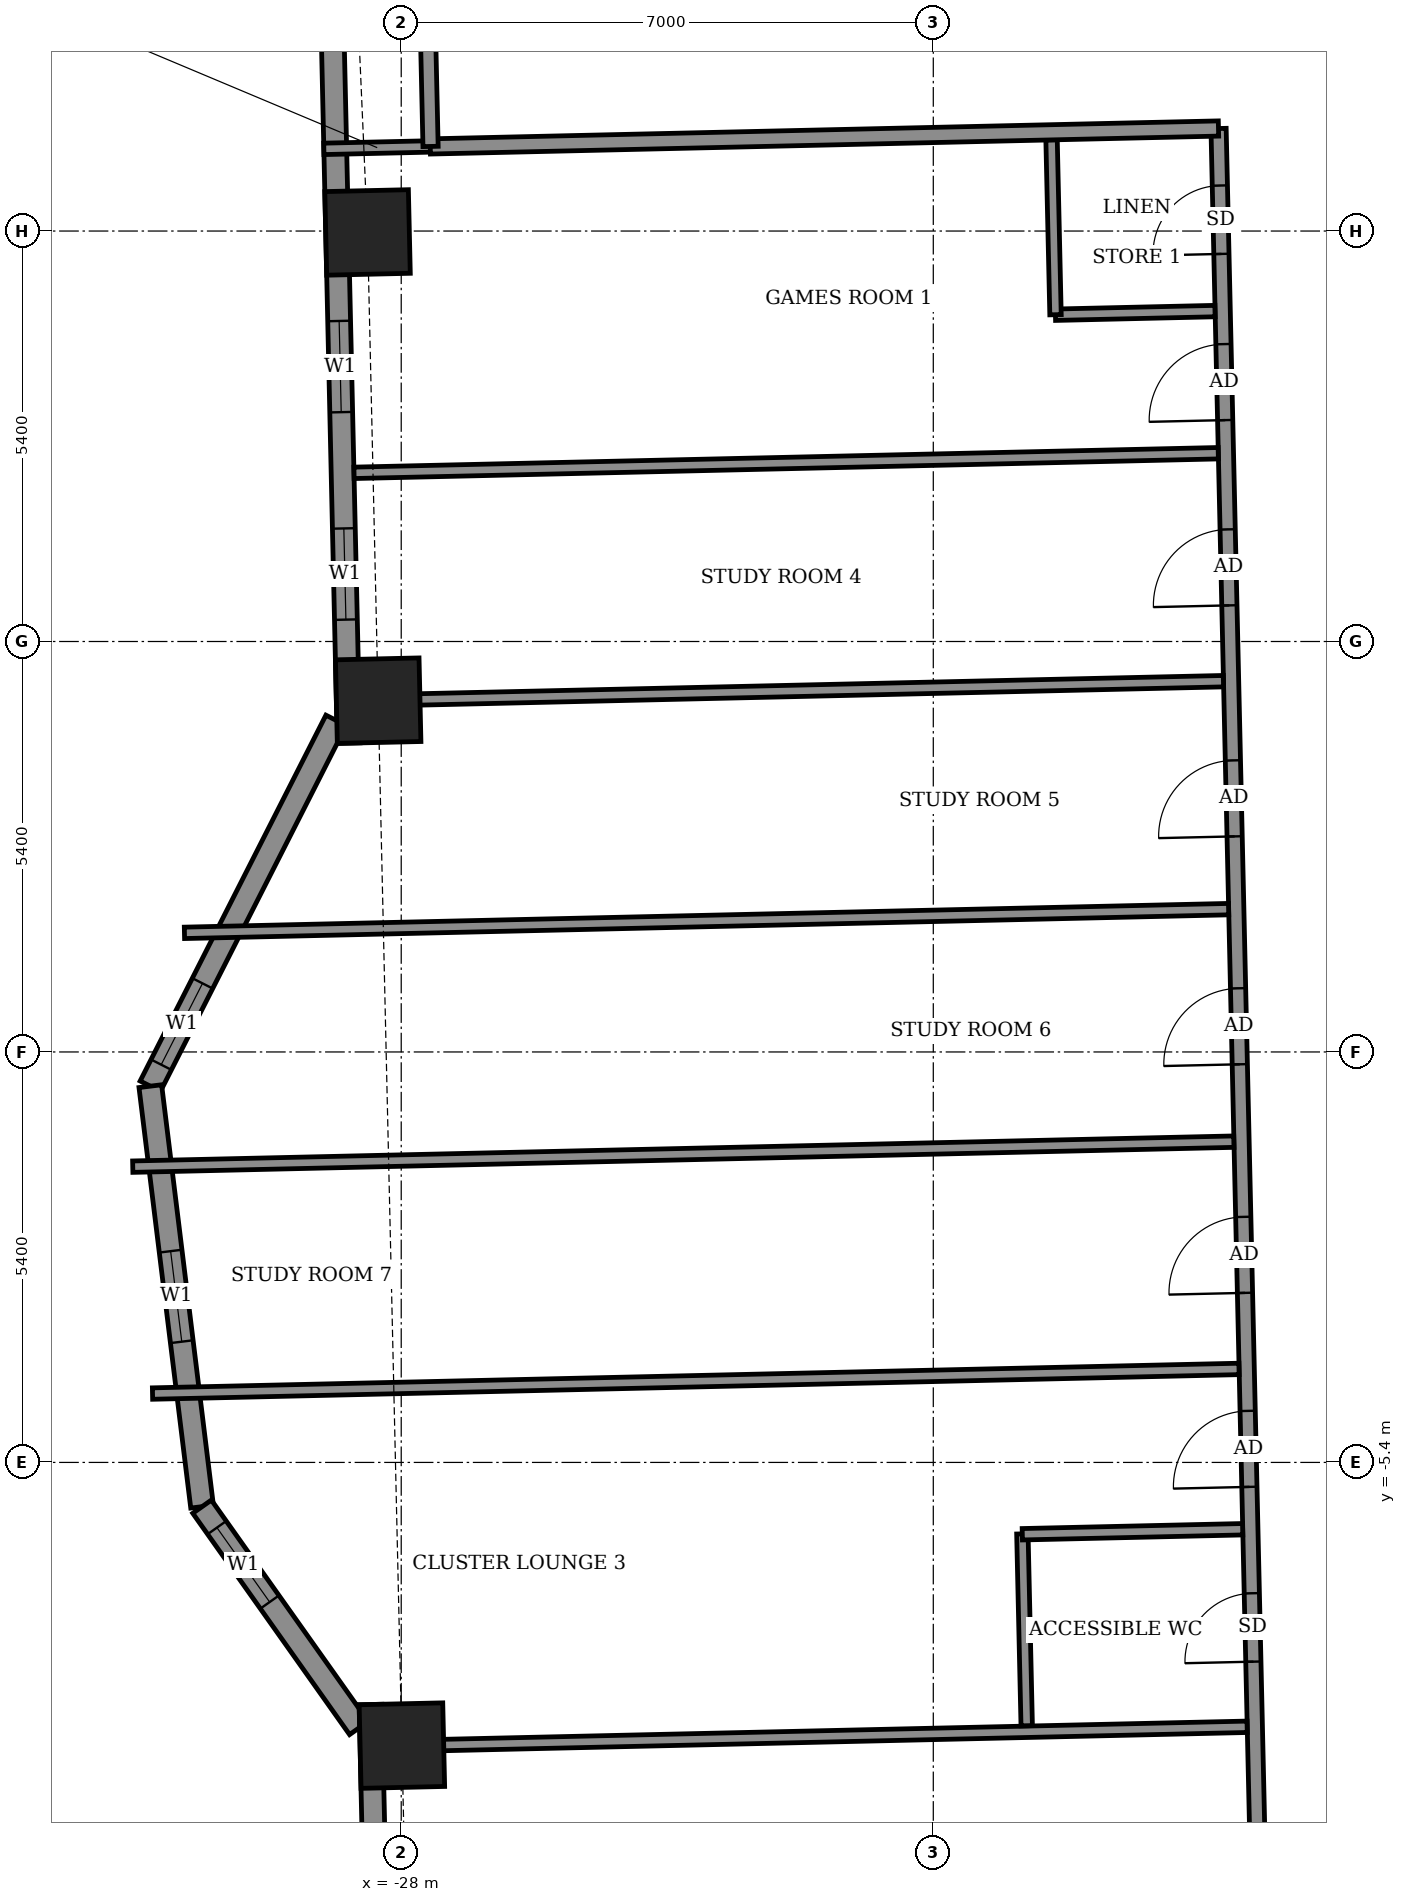
"""IFC4 building model, lengths in metres.
Left out: names, types, materials, properties, quantities, classifications, styles, units other than length and angle.
Written with IfcOpenShell. Run it as: python <this file> out.ifc"""

import sys

from ifc_helpers import new_model, si_unit, direction, frame, frame_2d, origin, origin_2d, place, context, subcontext, project, spatial, rectangle, extrude, element, fill, save


model = new_model("IFC4")
c1 = context("Model", 3, precision=1e-05, world=origin(), true_north=direction((0.0, 1.0)))
c2 = subcontext(c1, "Body", "Model", "MODEL_VIEW")
j1 = project(units=[si_unit("LENGTHUNIT", "METRE"), si_unit("PLANEANGLEUNIT", "RADIAN")], contexts=[c1])
p1 = place(None, origin())
s1 = spatial("IfcSite", under=j1, at=p1, CompositionType="ELEMENT")
p2 = place(p1, origin())
s2 = spatial("IfcBuilding", under=s1, at=p2, CompositionType="ELEMENT")
p3 = place(p2, frame((0.0, 0.0, 231.1)))
s3 = spatial("IfcBuildingStorey", under=s2, at=p3, CompositionType="ELEMENT", Elevation=231.1)
for number, where, z_axis, x_axis in (
    (1, (-27.991, -9.125, -0.55), (0.0, 0.0, 1.0), (0.023, -1.0, 0.0)),
    (2, (-28.443, 10.781, -0.55), (0.0, 0.0, 1.0), (0.023, -1.0, 0.0)),
    (3, (-28.303, 4.622, -0.55), (0.0, 0.0, 1.0), (0.023, -1.0, 0.0)),
):
    element("IfcColumn", number, at=place(p3, frame(where, z_axis=z_axis, x_axis=x_axis)), inside=s3, PredefinedType="COLUMN", context=c2, shape_type="SweptSolid", body=[
        extrude(rectangle(XDim=1.1, YDim=1.1, at=origin_2d()), origin(), (0.0, 0.0, 1.0), 3.6),
    ])
p4 = place(p3, frame((-28.979, 16.784, 0.0), z_axis=(0.0, 0.0, 1.0), x_axis=(0.022640773908, -0.999743664825, 0.0)))
e4 = element("IfcWall", 4, at=p4, inside=s3, PredefinedType="SOLIDWALL", context=c2, shape_type="SweptSolid", body=[
    extrude(rectangle(XDim=12.724, YDim=0.3, at=frame_2d((6.362, 0.0))), origin(), (0.0, 0.0, 1.0), 2.55),
])
p5 = place(p4, frame((2.06, 0.0, 0.0)))
e5 = element("IfcOpeningElement", 5, at=p5, cuts=e4, PredefinedType="OPENING", context=c2, shape_type="SweptSolid", body=[
    extrude(rectangle(XDim=1.5, YDim=2.4, at=frame_2d((0.75, 1.2))), frame((0.0, 0.16, 0.0), z_axis=(0.0, -1.0, 0.0), x_axis=(1.0, 0.0, 0.0)), (0.0, 0.0, 1.0), 0.32),
])
p6 = place(p4, frame((7.169, 0.0, 0.9)))
e6 = element("IfcOpeningElement", 6, at=p6, cuts=e4, PredefinedType="OPENING", context=c2, shape_type="SweptSolid", body=[
    extrude(rectangle(XDim=1.2, YDim=1.5, at=frame_2d((0.6, 0.75))), frame((0.0, 0.16, 0.0), z_axis=(0.0, -1.0, 0.0), x_axis=(1.0, 0.0, 0.0)), (0.0, 0.0, 1.0), 0.32),
])
p7 = place(p4, frame((9.899, 0.0, 0.9)))
e7 = element("IfcOpeningElement", 7, at=p7, cuts=e4, PredefinedType="OPENING", context=c2, shape_type="SweptSolid", body=[
    extrude(rectangle(XDim=1.2, YDim=1.5, at=frame_2d((0.6, 0.75))), frame((0.0, 0.16, 0.0), z_axis=(0.0, -1.0, 0.0), x_axis=(1.0, 0.0, 0.0)), (0.0, 0.0, 1.0), 0.32),
])
p8 = place(p3, frame((-28.857, 4.363, 0.0), z_axis=(0.0, 0.0, 1.0), x_axis=(-0.45277700056, -0.891623792731, 0.0)))
e8 = element("IfcWall", 8, at=p8, inside=s3, PredefinedType="SOLIDWALL", context=c2, shape_type="SweptSolid", body=[
    extrude(rectangle(XDim=5.398, YDim=0.3, at=frame_2d((2.699, 0.0))), origin(), (0.0, 0.0, 1.0), 3.05),
])
p9 = place(p8, frame((3.881, 0.0, 0.9)))
e9 = element("IfcOpeningElement", 9, at=p9, cuts=e8, PredefinedType="OPENING", context=c2, shape_type="SweptSolid", body=[
    extrude(rectangle(XDim=1.2, YDim=1.5, at=frame_2d((0.6, 0.75))), frame((0.0, 0.16, 0.0), z_axis=(0.0, -1.0, 0.0), x_axis=(1.0, 0.0, 0.0)), (0.0, 0.0, 1.0), 0.32),
])
p10 = place(p3, frame((-31.301, -0.45, 0.0), z_axis=(0.0, 0.0, 1.0), x_axis=(0.122163831021, -0.992509948761, 0.0)))
e10 = element("IfcWall", 10, at=p10, inside=s3, PredefinedType="SOLIDWALL", context=c2, shape_type="SweptSolid", body=[
    extrude(rectangle(XDim=5.574, YDim=0.3, at=frame_2d((2.787, 0.0))), origin(), (0.0, 0.0, 1.0), 3.05),
])
p11 = place(p10, frame((2.187, 0.0, 0.9)))
e11 = element("IfcOpeningElement", 11, at=p11, cuts=e10, PredefinedType="OPENING", context=c2, shape_type="SweptSolid", body=[
    extrude(rectangle(XDim=1.2, YDim=1.5, at=frame_2d((0.6, 0.75))), frame((0.0, 0.16, 0.0), z_axis=(0.0, -1.0, 0.0), x_axis=(1.0, 0.0, 0.0)), (0.0, 0.0, 1.0), 0.32),
])
p12 = place(p3, frame((-30.62, -5.982, 0.0), z_axis=(0.0, 0.0, 1.0), x_axis=(0.578108441206, -0.815959943996, 0.0)))
e12 = element("IfcWall", 12, at=p12, inside=s3, PredefinedType="SOLIDWALL", context=c2, shape_type="SweptSolid", body=[
    extrude(rectangle(XDim=3.569, YDim=0.3, at=frame_2d((1.784, 0.0))), origin(), (0.0, 0.0, 1.0), 3.05),
])
p13 = place(p12, frame((0.338, 0.0, 0.9)))
e13 = element("IfcOpeningElement", 13, at=p13, cuts=e12, PredefinedType="OPENING", context=c2, shape_type="SweptSolid", body=[
    extrude(rectangle(XDim=1.2, YDim=1.5, at=frame_2d((0.6, 0.75))), frame((0.0, 0.16, 0.0), z_axis=(0.0, -1.0, 0.0), x_axis=(1.0, 0.0, 0.0)), (0.0, 0.0, 1.0), 0.32),
])
p14 = place(p3, frame((-28.404, -8.585, 0.0), z_axis=(0.0, 0.0, 1.0), x_axis=(0.022711264838, -0.99974206596, 0.0)))
e14 = element("IfcWall", 14, at=p14, inside=s3, PredefinedType="SOLIDWALL", context=c2, shape_type="SweptSolid", body=[
    extrude(rectangle(XDim=13.125, YDim=0.3, at=frame_2d((6.563, 0.0))), origin(), (0.0, 0.0, 1.0), 2.55),
])
p15 = place(p14, frame((1.975, 0.0, 0.0)))
e15 = element("IfcOpeningElement", 15, at=p15, cuts=e14, PredefinedType="OPENING", context=c2, shape_type="SweptSolid", body=[
    extrude(rectangle(XDim=1.5, YDim=2.4, at=frame_2d((0.75, 1.2))), frame((0.0, 0.16, 0.0), z_axis=(0.0, -1.0, 0.0), x_axis=(1.0, 0.0, 0.0)), (0.0, 0.0, 1.0), 0.32),
])
p16 = place(p14, frame((8.624, 0.0, 0.9)))
e16 = element("IfcOpeningElement", 16, at=p16, cuts=e14, PredefinedType="OPENING", context=c2, shape_type="SweptSolid", body=[
    extrude(rectangle(XDim=2.4, YDim=1.5, at=frame_2d((1.2, 0.75))), frame((0.0, 0.16, 0.0), z_axis=(0.0, -1.0, 0.0), x_axis=(1.0, 0.0, 0.0)), (0.0, 0.0, 1.0), 0.32),
])
p17 = place(p3, frame((-16.678, -12.919, 0.0), z_axis=(0.0, 0.0, 1.0), x_axis=(-0.022696191528, 0.999742408268, 0.0)))
e17 = element("IfcWall", 17, at=p17, inside=s3, PredefinedType="PARTITIONING", context=c2, shape_type="SweptSolid", body=[
    extrude(rectangle(XDim=25.074, YDim=0.2, at=frame_2d((12.537, 0.0))), origin(), (0.0, 0.0, 1.0), 3.05),
])
p18 = place(p17, frame((21.237, 0.0, 0.0)))
e18 = element("IfcOpeningElement", 18, at=p18, cuts=e17, PredefinedType="OPENING", context=c2, shape_type="SweptSolid", body=[
    extrude(rectangle(XDim=1.0, YDim=2.1, at=frame_2d((0.5, 1.05))), frame((0.0, 0.11, 0.0), z_axis=(0.0, -1.0, 0.0), x_axis=(1.0, 0.0, 0.0)), (0.0, 0.0, 1.0), 0.22),
])
p19 = place(p17, frame((23.424, 0.0, 0.0)))
e19 = element("IfcOpeningElement", 19, at=p19, cuts=e17, PredefinedType="OPENING", context=c2, shape_type="SweptSolid", body=[
    extrude(rectangle(XDim=0.9, YDim=2.1, at=frame_2d((0.45, 1.05))), frame((0.0, 0.11, 0.0), z_axis=(0.0, -1.0, 0.0), x_axis=(1.0, 0.0, 0.0)), (0.0, 0.0, 1.0), 0.22),
])
p20 = place(p17, frame((18.799, 0.0, 0.0)))
e20 = element("IfcOpeningElement", 20, at=p20, cuts=e17, PredefinedType="OPENING", context=c2, shape_type="SweptSolid", body=[
    extrude(rectangle(XDim=1.0, YDim=2.1, at=frame_2d((0.5, 1.05))), frame((0.0, 0.11, 0.0), z_axis=(0.0, -1.0, 0.0), x_axis=(1.0, 0.0, 0.0)), (0.0, 0.0, 1.0), 0.22),
])
p21 = place(p17, frame((15.759, 0.0, 0.0)))
e21 = element("IfcOpeningElement", 21, at=p21, cuts=e17, PredefinedType="OPENING", context=c2, shape_type="SweptSolid", body=[
    extrude(rectangle(XDim=1.0, YDim=2.1, at=frame_2d((0.5, 1.05))), frame((0.0, 0.11, 0.0), z_axis=(0.0, -1.0, 0.0), x_axis=(1.0, 0.0, 0.0)), (0.0, 0.0, 1.0), 0.22),
])
p22 = place(p17, frame((12.76, 0.0, 0.0)))
e22 = element("IfcOpeningElement", 22, at=p22, cuts=e17, PredefinedType="OPENING", context=c2, shape_type="SweptSolid", body=[
    extrude(rectangle(XDim=1.0, YDim=2.1, at=frame_2d((0.5, 1.05))), frame((0.0, 0.11, 0.0), z_axis=(0.0, -1.0, 0.0), x_axis=(1.0, 0.0, 0.0)), (0.0, 0.0, 1.0), 0.22),
])
p23 = place(p17, frame((9.752, 0.0, 0.0)))
e23 = element("IfcOpeningElement", 23, at=p23, cuts=e17, PredefinedType="OPENING", context=c2, shape_type="SweptSolid", body=[
    extrude(rectangle(XDim=1.0, YDim=2.1, at=frame_2d((0.5, 1.05))), frame((0.0, 0.11, 0.0), z_axis=(0.0, -1.0, 0.0), x_axis=(1.0, 0.0, 0.0)), (0.0, 0.0, 1.0), 0.22),
])
p24 = place(p17, frame((7.199, 0.0, 0.0)))
e24 = element("IfcOpeningElement", 24, at=p24, cuts=e17, PredefinedType="OPENING", context=c2, shape_type="SweptSolid", body=[
    extrude(rectangle(XDim=1.0, YDim=2.1, at=frame_2d((0.5, 1.05))), frame((0.0, 0.11, 0.0), z_axis=(0.0, -1.0, 0.0), x_axis=(1.0, 0.0, 0.0)), (0.0, 0.0, 1.0), 0.22),
])
p25 = place(p17, frame((4.899, 0.0, 0.0)))
e25 = element("IfcOpeningElement", 25, at=p25, cuts=e17, PredefinedType="OPENING", context=c2, shape_type="SweptSolid", body=[
    extrude(rectangle(XDim=0.9, YDim=2.1, at=frame_2d((0.45, 1.05))), frame((0.0, 0.11, 0.0), z_axis=(0.0, -1.0, 0.0), x_axis=(1.0, 0.0, 0.0)), (0.0, 0.0, 1.0), 0.22),
])
p26 = place(p3, frame((-28.241, -9.136, 0.0), z_axis=(0.0, 0.0, 1.0), x_axis=(0.999742533279, 0.022690684282, 0.0)))
e26 = element("IfcWall", 26, at=p26, inside=s3, PredefinedType="PARTITIONING", context=c2, shape_type="SweptSolid", body=[
    extrude(rectangle(XDim=11.373, YDim=0.15, at=frame_2d((5.687, 0.0))), origin(), (0.0, 0.0, 1.0), 3.05),
])
p27 = place(p3, frame((-19.771, -8.864, 0.0), z_axis=(0.0, 0.0, 1.0), x_axis=(-0.022532486354, 0.9997461113, 0.0)))
e27 = element("IfcWall", 27, at=p27, inside=s3, PredefinedType="PARTITIONING", context=c2, shape_type="SweptSolid", body=[
    extrude(rectangle(XDim=2.525, YDim=0.15, at=frame_2d((1.262, 0.0))), origin(), (0.0, 0.0, 1.0), 3.05),
])
p28 = place(p3, frame((-19.829, -6.345, 0.0), z_axis=(0.0, 0.0, 1.0), x_axis=(0.999741618182, 0.022730967319, 0.0)))
e28 = element("IfcWall", 28, at=p28, inside=s3, PredefinedType="PARTITIONING", context=c2, shape_type="SweptSolid", body=[
    extrude(rectangle(XDim=2.9, YDim=0.15, at=frame_2d((1.45, 0.0))), origin(), (0.0, 0.0, 1.0), 3.05),
])
p29 = place(p3, frame((-31.272, -4.494, 0.0), z_axis=(0.0, 0.0, 1.0), x_axis=(0.999743244098, 0.022659344212, 0.0)))
e29 = element("IfcWall", 29, at=p29, inside=s3, PredefinedType="PARTITIONING", context=c2, shape_type="SweptSolid", body=[
    extrude(rectangle(XDim=14.298, YDim=0.15, at=frame_2d((7.149, 0.0))), origin(), (0.0, 0.0, 1.0), 2.05),
])
p30 = place(p3, frame((-31.532, -1.509, 0.0), z_axis=(0.0, 0.0, 1.0), x_axis=(0.999742035573, 0.022712602409, 0.0)))
e30 = element("IfcWall", 30, at=p30, inside=s3, PredefinedType="PARTITIONING", context=c2, shape_type="SweptSolid", body=[
    extrude(rectangle(XDim=14.49, YDim=0.15, at=frame_2d((7.245, 0.0))), origin(), (0.0, 0.0, 1.0), 2.05),
])
p31 = place(p3, frame((-30.852, 1.567, 0.0), z_axis=(0.0, 0.0, 1.0), x_axis=(0.999742156495, 0.022707279151, 0.0)))
e31 = element("IfcWall", 31, at=p31, inside=s3, PredefinedType="PARTITIONING", context=c2, shape_type="SweptSolid", body=[
    extrude(rectangle(XDim=13.741, YDim=0.15, at=frame_2d((6.87, 0.0))), origin(), (0.0, 0.0, 1.0), 2.05),
])
p32 = place(p3, frame((-28.554, 4.62, 0.0), z_axis=(0.0, 0.0, 1.0), x_axis=(0.999743064147, 0.022667282356, 0.0)))
e32 = element("IfcWall", 32, at=p32, inside=s3, PredefinedType="PARTITIONING", context=c2, shape_type="SweptSolid", body=[
    extrude(rectangle(XDim=11.374, YDim=0.15, at=frame_2d((5.687, 0.0))), origin(), (0.0, 0.0, 1.0), 3.05),
])
p33 = place(p3, frame((-28.621, 7.619, 0.0), z_axis=(0.0, 0.0, 1.0), x_axis=(0.999742544331, 0.022690197315, 0.0)))
e33 = element("IfcWall", 33, at=p33, inside=s3, PredefinedType="PARTITIONING", context=c2, shape_type="SweptSolid", body=[
    extrude(rectangle(XDim=11.373, YDim=0.15, at=frame_2d((5.687, 0.0))), origin(), (0.0, 0.0, 1.0), 2.55),
])
p34 = place(p3, frame((-19.393, 9.699, 0.0), z_axis=(0.0, 0.0, 1.0), x_axis=(0.999737616439, 0.022906293375, 0.0)))
e34 = element("IfcWall", 34, at=p34, inside=s3, PredefinedType="PARTITIONING", context=c2, shape_type="SweptSolid", body=[
    extrude(rectangle(XDim=2.1, YDim=0.15, at=frame_2d((1.05, 0.0))), origin(), (0.0, 0.0, 1.0), 3.05),
])
p35 = place(p3, frame((-19.392, 9.699, 0.0), z_axis=(0.0, 0.0, 1.0), x_axis=(-0.022603288534, 0.999744513037, 0.0)))
e35 = element("IfcWall", 35, at=p35, inside=s3, PredefinedType="PARTITIONING", context=c2, shape_type="SweptSolid", body=[
    extrude(rectangle(XDim=2.301, YDim=0.15, at=frame_2d((1.15, 0.0))), origin(), (0.0, 0.0, 1.0), 3.05),
])
p36 = place(p3, frame((-29.018, 11.881, 0.0), z_axis=(0.0, 0.0, 1.0), x_axis=(0.999740667531, 0.022772739949, 0.0)))
e36 = element("IfcWall", 36, at=p36, inside=s3, PredefinedType="PARTITIONING", context=c2, shape_type="SweptSolid", body=[
    extrude(rectangle(XDim=1.404, YDim=0.15, at=frame_2d((0.702, 0.0))), origin(), (0.0, 0.0, 1.0), 2.55),
])
p37 = place(p3, frame((-27.618, 11.913, 0.0), z_axis=(0.0, 0.0, 1.0), x_axis=(0.999741483035, 0.022736910479, 0.0)))
e37 = element("IfcWall", 37, at=p37, inside=s3, PredefinedType="PARTITIONING", context=c2, shape_type="SweptSolid", body=[
    extrude(rectangle(XDim=10.373, YDim=0.2, at=frame_2d((5.186, 0.0))), origin(), (0.0, 0.0, 1.0), 3.05),
])
p38 = place(p3, frame((-27.614, 11.913, 0.0), z_axis=(0.0, 0.0, 1.0), x_axis=(-0.022617910375, 0.999744182344, 0.0)))
e38 = element("IfcWall", 38, at=p38, inside=s3, PredefinedType="PARTITIONING", context=c2, shape_type="SweptSolid", body=[
    extrude(rectangle(XDim=1.5, YDim=0.2, at=frame_2d((0.75, 0.0))), origin(), (0.0, 0.0, 1.0), 3.05),
])
p39 = place(p6, origin())
e39 = element("IfcWindow", 39, at=p39, inside=s3, PartitioningType="SINGLE_PANEL", PredefinedType="WINDOW", context=c2, shape_type="SweptSolid", body=[
    extrude(rectangle(XDim=1.2, YDim=1.5, at=frame_2d((0.6, 0.75))), frame((0.0, 0.03, 0.0), z_axis=(0.0, -1.0, 0.0), x_axis=(1.0, 0.0, 0.0)), (0.0, 0.0, 1.0), 0.06),
])
fill(e6, e39)
p40 = place(p7, origin())
e40 = element("IfcWindow", 40, at=p40, inside=s3, PartitioningType="SINGLE_PANEL", PredefinedType="WINDOW", context=c2, shape_type="SweptSolid", body=[
    extrude(rectangle(XDim=1.2, YDim=1.5, at=frame_2d((0.6, 0.75))), frame((0.0, 0.03, 0.0), z_axis=(0.0, -1.0, 0.0), x_axis=(1.0, 0.0, 0.0)), (0.0, 0.0, 1.0), 0.06),
])
fill(e7, e40)
p41 = place(p9, origin())
e41 = element("IfcWindow", 41, at=p41, inside=s3, PartitioningType="SINGLE_PANEL", PredefinedType="WINDOW", context=c2, shape_type="SweptSolid", body=[
    extrude(rectangle(XDim=1.2, YDim=1.5, at=frame_2d((0.6, 0.75))), frame((0.0, 0.03, 0.0), z_axis=(0.0, -1.0, 0.0), x_axis=(1.0, 0.0, 0.0)), (0.0, 0.0, 1.0), 0.06),
])
fill(e9, e41)
p42 = place(p11, origin())
e42 = element("IfcWindow", 42, at=p42, inside=s3, PartitioningType="SINGLE_PANEL", PredefinedType="WINDOW", context=c2, shape_type="SweptSolid", body=[
    extrude(rectangle(XDim=1.2, YDim=1.5, at=frame_2d((0.6, 0.75))), frame((0.0, 0.03, 0.0), z_axis=(0.0, -1.0, 0.0), x_axis=(1.0, 0.0, 0.0)), (0.0, 0.0, 1.0), 0.06),
])
fill(e11, e42)
p43 = place(p13, origin())
e43 = element("IfcWindow", 43, at=p43, inside=s3, PartitioningType="SINGLE_PANEL", PredefinedType="WINDOW", context=c2, shape_type="SweptSolid", body=[
    extrude(rectangle(XDim=1.2, YDim=1.5, at=frame_2d((0.6, 0.75))), frame((0.0, 0.03, 0.0), z_axis=(0.0, -1.0, 0.0), x_axis=(1.0, 0.0, 0.0)), (0.0, 0.0, 1.0), 0.06),
])
fill(e13, e43)
p44 = place(p18, origin())
e44 = element("IfcDoor", 44, at=p44, inside=s3, OperationType="SINGLE_SWING_LEFT", PredefinedType="DOOR", context=c2, shape_type="SweptSolid", body=[
    extrude(rectangle(XDim=1.0, YDim=2.1, at=frame_2d((0.5, 1.05))), frame((0.0, 0.025, 0.0), z_axis=(0.0, -1.0, 0.0), x_axis=(1.0, 0.0, 0.0)), (0.0, 0.0, 1.0), 0.05),
])
fill(e18, e44)
p45 = place(p19, origin())
e45 = element("IfcDoor", 45, at=p45, inside=s3, OperationType="SINGLE_SWING_RIGHT", PredefinedType="DOOR", context=c2, shape_type="SweptSolid", body=[
    extrude(rectangle(XDim=0.9, YDim=2.1, at=frame_2d((0.45, 1.05))), frame((0.0, 0.025, 0.0), z_axis=(0.0, -1.0, 0.0), x_axis=(1.0, 0.0, 0.0)), (0.0, 0.0, 1.0), 0.05),
])
fill(e19, e45)
p46 = place(p20, origin())
e46 = element("IfcDoor", 46, at=p46, inside=s3, OperationType="SINGLE_SWING_RIGHT", PredefinedType="DOOR", context=c2, shape_type="SweptSolid", body=[
    extrude(rectangle(XDim=1.0, YDim=2.1, at=frame_2d((0.5, 1.05))), frame((0.0, 0.025, 0.0), z_axis=(0.0, -1.0, 0.0), x_axis=(1.0, 0.0, 0.0)), (0.0, 0.0, 1.0), 0.05),
])
fill(e20, e46)
p47 = place(p21, origin())
e47 = element("IfcDoor", 47, at=p47, inside=s3, OperationType="SINGLE_SWING_LEFT", PredefinedType="DOOR", context=c2, shape_type="SweptSolid", body=[
    extrude(rectangle(XDim=1.0, YDim=2.1, at=frame_2d((0.5, 1.05))), frame((0.0, 0.025, 0.0), z_axis=(0.0, -1.0, 0.0), x_axis=(1.0, 0.0, 0.0)), (0.0, 0.0, 1.0), 0.05),
])
fill(e21, e47)
p48 = place(p22, origin())
e48 = element("IfcDoor", 48, at=p48, inside=s3, OperationType="SINGLE_SWING_RIGHT", PredefinedType="DOOR", context=c2, shape_type="SweptSolid", body=[
    extrude(rectangle(XDim=1.0, YDim=2.1, at=frame_2d((0.5, 1.05))), frame((0.0, 0.025, 0.0), z_axis=(0.0, -1.0, 0.0), x_axis=(1.0, 0.0, 0.0)), (0.0, 0.0, 1.0), 0.05),
])
fill(e22, e48)
p49 = place(p23, origin())
e49 = element("IfcDoor", 49, at=p49, inside=s3, OperationType="SINGLE_SWING_LEFT", PredefinedType="DOOR", context=c2, shape_type="SweptSolid", body=[
    extrude(rectangle(XDim=1.0, YDim=2.1, at=frame_2d((0.5, 1.05))), frame((0.0, 0.025, 0.0), z_axis=(0.0, -1.0, 0.0), x_axis=(1.0, 0.0, 0.0)), (0.0, 0.0, 1.0), 0.05),
])
fill(e23, e49)
p50 = place(p24, origin())
e50 = element("IfcDoor", 50, at=p50, inside=s3, OperationType="SINGLE_SWING_RIGHT", PredefinedType="DOOR", context=c2, shape_type="SweptSolid", body=[
    extrude(rectangle(XDim=1.0, YDim=2.1, at=frame_2d((0.5, 1.05))), frame((0.0, 0.025, 0.0), z_axis=(0.0, -1.0, 0.0), x_axis=(1.0, 0.0, 0.0)), (0.0, 0.0, 1.0), 0.05),
])
fill(e24, e50)
p51 = place(p25, origin())
e51 = element("IfcDoor", 51, at=p51, inside=s3, OperationType="SINGLE_SWING_LEFT", PredefinedType="DOOR", context=c2, shape_type="SweptSolid", body=[
    extrude(rectangle(XDim=0.9, YDim=2.1, at=frame_2d((0.45, 1.05))), frame((0.0, 0.025, 0.0), z_axis=(0.0, -1.0, 0.0), x_axis=(1.0, 0.0, 0.0)), (0.0, 0.0, 1.0), 0.05),
])
fill(e25, e51)
save(model, sys.argv[1])
